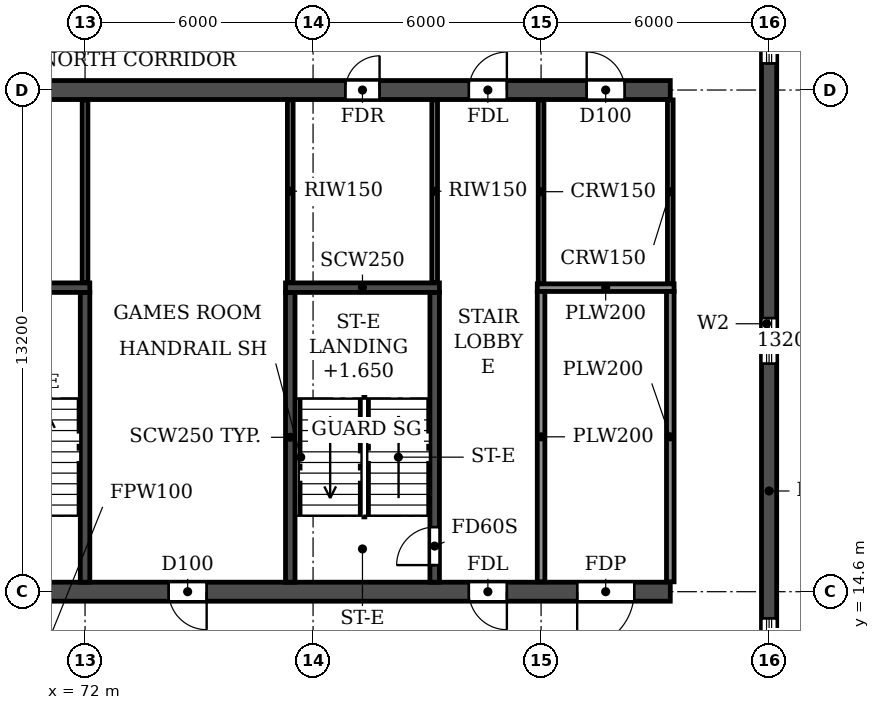
"""IFC4 building model, lengths in metres.
Left out: names, types, materials, properties, quantities, classifications, styles, units other than length and angle.
Written with IfcOpenShell. Run it as: python <this file> out.ifc"""

import sys

from ifc_helpers import new_model, si_unit, direction, frame, frame_2d, origin, place, context, subcontext, project, spatial, rectangle, extrude, element, fill, save


model = new_model("IFC4")
c1 = context("Model", 3, precision=1e-05, world=origin(), true_north=direction((0.0, 1.0)))
c2 = subcontext(c1, "Body", "Model", "MODEL_VIEW")
j1 = project(units=[si_unit("LENGTHUNIT", "METRE"), si_unit("PLANEANGLEUNIT", "RADIAN")], contexts=[c1])
p1 = place(None, origin())
s1 = spatial("IfcSite", under=j1, at=p1, CompositionType="ELEMENT")
p2 = place(p1, origin())
s2 = spatial("IfcBuilding", under=s1, at=p2, CompositionType="ELEMENT")
p3 = place(p2, frame((0.0, 0.0, 109.2)))
s3 = spatial("IfcBuildingStorey", under=s2, at=p3, CompositionType="ELEMENT", Elevation=109.2)
p4 = place(p3, frame((90.0, 4.683, 0.0), z_axis=(0.0, 0.0, 1.0), x_axis=(0.0, 1.0, 0.0)))
e1 = element("IfcWall", 1, at=p4, inside=s3, PredefinedType="SHEAR", context=c2, shape_type="SweptSolid", body=[
    extrude(rectangle(XDim=34.234, YDim=0.4, at=frame_2d((17.117, 0.0))), origin(), (0.0, 0.0, 1.0), 3.06),
])
p5 = place(p4, frame((15.917, 0.0, 0.9)))
e2 = element("IfcOpeningElement", 2, at=p5, cuts=e1, PredefinedType="OPENING", context=c2, shape_type="SweptSolid", body=[
    extrude(rectangle(XDim=1.2, YDim=1.5, at=frame_2d((0.6, 0.75))), frame((0.0, 0.21, 0.0), z_axis=(0.0, -1.0, 0.0), x_axis=(1.0, 0.0, 0.0)), (0.0, 0.0, 1.0), 0.42),
])
p6 = place(p4, frame((23.817, 0.0, 0.9)))
e3 = element("IfcOpeningElement", 3, at=p6, cuts=e1, PredefinedType="OPENING", context=c2, shape_type="SweptSolid", body=[
    extrude(rectangle(XDim=1.2, YDim=1.5, at=frame_2d((0.6, 0.75))), frame((0.0, 0.21, 0.0), z_axis=(0.0, -1.0, 0.0), x_axis=(1.0, 0.0, 0.0)), (0.0, 0.0, 1.0), 0.42),
])
p7 = place(p4, frame((8.017, 0.0, 0.9)))
e4 = element("IfcOpeningElement", 4, at=p7, cuts=e1, PredefinedType="OPENING", context=c2, shape_type="SweptSolid", body=[
    extrude(rectangle(XDim=1.2, YDim=1.5, at=frame_2d((0.6, 0.75))), frame((0.0, 0.21, 0.0), z_axis=(0.0, -1.0, 0.0), x_axis=(1.0, 0.0, 0.0)), (0.0, 0.0, 1.0), 0.42),
])
p8 = place(p4, frame((28.894, 0.0, 0.6)))
e5 = element("IfcOpeningElement", 5, at=p8, cuts=e1, PredefinedType="OPENING", context=c2, shape_type="SweptSolid", body=[
    extrude(rectangle(XDim=2.2, YDim=1.8, at=frame_2d((1.1, 0.9))), frame((0.0, 0.21, 0.0), z_axis=(0.0, -1.0, 0.0), x_axis=(1.0, 0.0, 0.0)), (0.0, 0.0, 1.0), 0.42),
])
p9 = place(p4, frame((2.541, 0.0, 0.6)))
e6 = element("IfcOpeningElement", 6, at=p9, cuts=e1, PredefinedType="OPENING", context=c2, shape_type="SweptSolid", body=[
    extrude(rectangle(XDim=2.2, YDim=1.8, at=frame_2d((1.1, 0.9))), frame((0.0, 0.21, 0.0), z_axis=(0.0, -1.0, 0.0), x_axis=(1.0, 0.0, 0.0)), (0.0, 0.0, 1.0), 0.42),
])
p10 = place(p3, frame((14.6, 14.6, 0.0), z_axis=(0.0, 0.0, 1.0), x_axis=(1.0, 0.0, 0.0)))
e7 = element("IfcWall", 7, at=p10, inside=s3, PredefinedType="SOLIDWALL", context=c2, shape_type="SweptSolid", body=[
    extrude(rectangle(XDim=72.8, YDim=0.5, at=frame_2d((36.4, 0.0))), origin(), (0.0, 0.0, 1.0), 3.06),
])
p11 = place(p10, frame((1.2, 0.0, 0.0)))
e8 = element("IfcOpeningElement", 8, at=p11, cuts=e7, PredefinedType="OPENING", context=c2, shape_type="SweptSolid", body=[
    extrude(rectangle(XDim=1.0, YDim=2.1, at=frame_2d((0.5, 1.05))), frame((0.0, 0.26, 0.0), z_axis=(0.0, -1.0, 0.0), x_axis=(1.0, 0.0, 0.0)), (0.0, 0.0, 1.0), 0.52),
])
p12 = place(p10, frame((4.3, 0.0, 0.0)))
e9 = element("IfcOpeningElement", 9, at=p12, cuts=e7, PredefinedType="OPENING", context=c2, shape_type="SweptSolid", body=[
    extrude(rectangle(XDim=1.0, YDim=2.1, at=frame_2d((0.5, 1.05))), frame((0.0, 0.26, 0.0), z_axis=(0.0, -1.0, 0.0), x_axis=(1.0, 0.0, 0.0)), (0.0, 0.0, 1.0), 0.52),
])
p13 = place(p10, frame((12.2, 0.0, 0.0)))
e10 = element("IfcOpeningElement", 10, at=p13, cuts=e7, PredefinedType="OPENING", context=c2, shape_type="SweptSolid", body=[
    extrude(rectangle(XDim=1.0, YDim=2.1, at=frame_2d((0.5, 1.05))), frame((0.0, 0.26, 0.0), z_axis=(0.0, -1.0, 0.0), x_axis=(1.0, 0.0, 0.0)), (0.0, 0.0, 1.0), 0.52),
])
p14 = place(p10, frame((16.8, 0.0, 0.0)))
e11 = element("IfcOpeningElement", 11, at=p14, cuts=e7, PredefinedType="OPENING", context=c2, shape_type="SweptSolid", body=[
    extrude(rectangle(XDim=1.0, YDim=2.1, at=frame_2d((0.5, 1.05))), frame((0.0, 0.26, 0.0), z_axis=(0.0, -1.0, 0.0), x_axis=(1.0, 0.0, 0.0)), (0.0, 0.0, 1.0), 0.52),
])
p15 = place(p10, frame((28.1, 0.0, 0.0)))
e12 = element("IfcOpeningElement", 12, at=p15, cuts=e7, PredefinedType="OPENING", context=c2, shape_type="SweptSolid", body=[
    extrude(rectangle(XDim=1.0, YDim=2.1, at=frame_2d((0.5, 1.05))), frame((0.0, 0.26, 0.0), z_axis=(0.0, -1.0, 0.0), x_axis=(1.0, 0.0, 0.0)), (0.0, 0.0, 1.0), 0.52),
])
p16 = place(p10, frame((32.0, 0.0, 0.0)))
e13 = element("IfcOpeningElement", 13, at=p16, cuts=e7, PredefinedType="OPENING", context=c2, shape_type="SweptSolid", body=[
    extrude(rectangle(XDim=1.0, YDim=2.1, at=frame_2d((0.5, 1.05))), frame((0.0, 0.26, 0.0), z_axis=(0.0, -1.0, 0.0), x_axis=(1.0, 0.0, 0.0)), (0.0, 0.0, 1.0), 0.52),
])
p17 = place(p10, frame((35.9, 0.0, 0.0)))
e14 = element("IfcOpeningElement", 14, at=p17, cuts=e7, PredefinedType="OPENING", context=c2, shape_type="SweptSolid", body=[
    extrude(rectangle(XDim=1.0, YDim=2.1, at=frame_2d((0.5, 1.05))), frame((0.0, 0.26, 0.0), z_axis=(0.0, -1.0, 0.0), x_axis=(1.0, 0.0, 0.0)), (0.0, 0.0, 1.0), 0.52),
])
p18 = place(p10, frame((39.8, 0.0, 0.0)))
e15 = element("IfcOpeningElement", 15, at=p18, cuts=e7, PredefinedType="OPENING", context=c2, shape_type="SweptSolid", body=[
    extrude(rectangle(XDim=1.0, YDim=2.1, at=frame_2d((0.5, 1.05))), frame((0.0, 0.26, 0.0), z_axis=(0.0, -1.0, 0.0), x_axis=(1.0, 0.0, 0.0)), (0.0, 0.0, 1.0), 0.52),
])
p19 = place(p10, frame((43.7, 0.0, 0.0)))
e16 = element("IfcOpeningElement", 16, at=p19, cuts=e7, PredefinedType="OPENING", context=c2, shape_type="SweptSolid", body=[
    extrude(rectangle(XDim=1.0, YDim=2.1, at=frame_2d((0.5, 1.05))), frame((0.0, 0.26, 0.0), z_axis=(0.0, -1.0, 0.0), x_axis=(1.0, 0.0, 0.0)), (0.0, 0.0, 1.0), 0.52),
])
p20 = place(p10, frame((55.0, 0.0, 0.0)))
e17 = element("IfcOpeningElement", 17, at=p20, cuts=e7, PredefinedType="OPENING", context=c2, shape_type="SweptSolid", body=[
    extrude(rectangle(XDim=1.0, YDim=2.1, at=frame_2d((0.5, 1.05))), frame((0.0, 0.26, 0.0), z_axis=(0.0, -1.0, 0.0), x_axis=(1.0, 0.0, 0.0)), (0.0, 0.0, 1.0), 0.52),
])
p21 = place(p10, frame((59.6, 0.0, 0.0)))
e18 = element("IfcOpeningElement", 18, at=p21, cuts=e7, PredefinedType="OPENING", context=c2, shape_type="SweptSolid", body=[
    extrude(rectangle(XDim=1.0, YDim=2.1, at=frame_2d((0.5, 1.05))), frame((0.0, 0.26, 0.0), z_axis=(0.0, -1.0, 0.0), x_axis=(1.0, 0.0, 0.0)), (0.0, 0.0, 1.0), 0.52),
])
p22 = place(p10, frame((67.5, 0.0, 0.0)))
e19 = element("IfcOpeningElement", 19, at=p22, cuts=e7, PredefinedType="OPENING", context=c2, shape_type="SweptSolid", body=[
    extrude(rectangle(XDim=1.0, YDim=2.1, at=frame_2d((0.5, 1.05))), frame((0.0, 0.26, 0.0), z_axis=(0.0, -1.0, 0.0), x_axis=(1.0, 0.0, 0.0)), (0.0, 0.0, 1.0), 0.52),
])
p23 = place(p10, frame((70.35, 0.0, 0.0)))
e20 = element("IfcOpeningElement", 20, at=p23, cuts=e7, PredefinedType="OPENING", context=c2, shape_type="SweptSolid", body=[
    extrude(rectangle(XDim=1.5, YDim=2.1, at=frame_2d((0.75, 1.05))), frame((0.0, 0.26, 0.0), z_axis=(0.0, -1.0, 0.0), x_axis=(1.0, 0.0, 0.0)), (0.0, 0.0, 1.0), 0.52),
])
p24 = place(p3, frame((14.6, 27.8, 0.0), z_axis=(0.0, 0.0, 1.0), x_axis=(1.0, 0.0, 0.0)))
e21 = element("IfcWall", 21, at=p24, inside=s3, PredefinedType="SOLIDWALL", context=c2, shape_type="SweptSolid", body=[
    extrude(rectangle(XDim=72.8, YDim=0.5, at=frame_2d((36.4, 0.0))), origin(), (0.0, 0.0, 1.0), 3.06),
])
p25 = place(p24, frame((1.2, 0.0, 0.0)))
e22 = element("IfcOpeningElement", 22, at=p25, cuts=e21, PredefinedType="OPENING", context=c2, shape_type="SweptSolid", body=[
    extrude(rectangle(XDim=1.0, YDim=2.1, at=frame_2d((0.5, 1.05))), frame((0.0, 0.26, 0.0), z_axis=(0.0, -1.0, 0.0), x_axis=(1.0, 0.0, 0.0)), (0.0, 0.0, 1.0), 0.52),
])
p26 = place(p24, frame((4.3, 0.0, 0.0)))
e23 = element("IfcOpeningElement", 23, at=p26, cuts=e21, PredefinedType="OPENING", context=c2, shape_type="SweptSolid", body=[
    extrude(rectangle(XDim=1.0, YDim=2.1, at=frame_2d((0.5, 1.05))), frame((0.0, 0.26, 0.0), z_axis=(0.0, -1.0, 0.0), x_axis=(1.0, 0.0, 0.0)), (0.0, 0.0, 1.0), 0.52),
])
p27 = place(p24, frame((7.65, 0.0, 0.0)))
e24 = element("IfcOpeningElement", 24, at=p27, cuts=e21, PredefinedType="OPENING", context=c2, shape_type="SweptSolid", body=[
    extrude(rectangle(XDim=0.9, YDim=2.1, at=frame_2d((0.45, 1.05))), frame((0.0, 0.26, 0.0), z_axis=(0.0, -1.0, 0.0), x_axis=(1.0, 0.0, 0.0)), (0.0, 0.0, 1.0), 0.52),
])
p28 = place(p24, frame((16.85, 0.0, 0.0)))
e25 = element("IfcOpeningElement", 25, at=p28, cuts=e21, PredefinedType="OPENING", context=c2, shape_type="SweptSolid", body=[
    extrude(rectangle(XDim=0.9, YDim=2.1, at=frame_2d((0.45, 1.05))), frame((0.0, 0.26, 0.0), z_axis=(0.0, -1.0, 0.0), x_axis=(1.0, 0.0, 0.0)), (0.0, 0.0, 1.0), 0.52),
])
p29 = place(p24, frame((20.0, 0.0, 0.0)))
e26 = element("IfcOpeningElement", 26, at=p29, cuts=e21, PredefinedType="OPENING", context=c2, shape_type="SweptSolid", body=[
    extrude(rectangle(XDim=1.0, YDim=2.1, at=frame_2d((0.5, 1.05))), frame((0.0, 0.26, 0.0), z_axis=(0.0, -1.0, 0.0), x_axis=(1.0, 0.0, 0.0)), (0.0, 0.0, 1.0), 0.52),
])
p30 = place(p24, frame((25.2, 0.0, 0.0)))
e27 = element("IfcOpeningElement", 27, at=p30, cuts=e21, PredefinedType="OPENING", context=c2, shape_type="SweptSolid", body=[
    extrude(rectangle(XDim=1.0, YDim=2.1, at=frame_2d((0.5, 1.05))), frame((0.0, 0.26, 0.0), z_axis=(0.0, -1.0, 0.0), x_axis=(1.0, 0.0, 0.0)), (0.0, 0.0, 1.0), 0.52),
])
p31 = place(p24, frame((33.0, 0.0, 0.0)))
e28 = element("IfcOpeningElement", 28, at=p31, cuts=e21, PredefinedType="OPENING", context=c2, shape_type="SweptSolid", body=[
    extrude(rectangle(XDim=1.0, YDim=2.1, at=frame_2d((0.5, 1.05))), frame((0.0, 0.26, 0.0), z_axis=(0.0, -1.0, 0.0), x_axis=(1.0, 0.0, 0.0)), (0.0, 0.0, 1.0), 0.52),
])
p32 = place(p24, frame((35.9, 0.0, 0.0)))
e29 = element("IfcOpeningElement", 29, at=p32, cuts=e21, PredefinedType="OPENING", context=c2, shape_type="SweptSolid", body=[
    extrude(rectangle(XDim=1.0, YDim=2.1, at=frame_2d((0.5, 1.05))), frame((0.0, 0.26, 0.0), z_axis=(0.0, -1.0, 0.0), x_axis=(1.0, 0.0, 0.0)), (0.0, 0.0, 1.0), 0.52),
])
p33 = place(p24, frame((38.8, 0.0, 0.0)))
e30 = element("IfcOpeningElement", 30, at=p33, cuts=e21, PredefinedType="OPENING", context=c2, shape_type="SweptSolid", body=[
    extrude(rectangle(XDim=1.0, YDim=2.1, at=frame_2d((0.5, 1.05))), frame((0.0, 0.26, 0.0), z_axis=(0.0, -1.0, 0.0), x_axis=(1.0, 0.0, 0.0)), (0.0, 0.0, 1.0), 0.52),
])
p34 = place(p24, frame((42.7, 0.0, 0.0)))
e31 = element("IfcOpeningElement", 31, at=p34, cuts=e21, PredefinedType="OPENING", context=c2, shape_type="SweptSolid", body=[
    extrude(rectangle(XDim=1.0, YDim=2.1, at=frame_2d((0.5, 1.05))), frame((0.0, 0.26, 0.0), z_axis=(0.0, -1.0, 0.0), x_axis=(1.0, 0.0, 0.0)), (0.0, 0.0, 1.0), 0.52),
])
p35 = place(p24, frame((47.65, 0.0, 0.0)))
e32 = element("IfcOpeningElement", 32, at=p35, cuts=e21, PredefinedType="OPENING", context=c2, shape_type="SweptSolid", body=[
    extrude(rectangle(XDim=1.5, YDim=2.1, at=frame_2d((0.75, 1.05))), frame((0.0, 0.26, 0.0), z_axis=(0.0, -1.0, 0.0), x_axis=(1.0, 0.0, 0.0)), (0.0, 0.0, 1.0), 0.52),
])
p36 = place(p24, frame((51.8, 0.0, 0.0)))
e33 = element("IfcOpeningElement", 33, at=p36, cuts=e21, PredefinedType="OPENING", context=c2, shape_type="SweptSolid", body=[
    extrude(rectangle(XDim=1.0, YDim=2.1, at=frame_2d((0.5, 1.05))), frame((0.0, 0.26, 0.0), z_axis=(0.0, -1.0, 0.0), x_axis=(1.0, 0.0, 0.0)), (0.0, 0.0, 1.0), 0.52),
])
p37 = place(p24, frame((55.05, 0.0, 0.0)))
e34 = element("IfcOpeningElement", 34, at=p37, cuts=e21, PredefinedType="OPENING", context=c2, shape_type="SweptSolid", body=[
    extrude(rectangle(XDim=0.9, YDim=2.1, at=frame_2d((0.45, 1.05))), frame((0.0, 0.26, 0.0), z_axis=(0.0, -1.0, 0.0), x_axis=(1.0, 0.0, 0.0)), (0.0, 0.0, 1.0), 0.52),
])
p38 = place(p24, frame((64.25, 0.0, 0.0)))
e35 = element("IfcOpeningElement", 35, at=p38, cuts=e21, PredefinedType="OPENING", context=c2, shape_type="SweptSolid", body=[
    extrude(rectangle(XDim=0.9, YDim=2.1, at=frame_2d((0.45, 1.05))), frame((0.0, 0.26, 0.0), z_axis=(0.0, -1.0, 0.0), x_axis=(1.0, 0.0, 0.0)), (0.0, 0.0, 1.0), 0.52),
])
p39 = place(p24, frame((67.5, 0.0, 0.0)))
e36 = element("IfcOpeningElement", 36, at=p39, cuts=e21, PredefinedType="OPENING", context=c2, shape_type="SweptSolid", body=[
    extrude(rectangle(XDim=1.0, YDim=2.1, at=frame_2d((0.5, 1.05))), frame((0.0, 0.26, 0.0), z_axis=(0.0, -1.0, 0.0), x_axis=(1.0, 0.0, 0.0)), (0.0, 0.0, 1.0), 0.52),
])
p40 = place(p24, frame((70.6, 0.0, 0.0)))
e37 = element("IfcOpeningElement", 37, at=p40, cuts=e21, PredefinedType="OPENING", context=c2, shape_type="SweptSolid", body=[
    extrude(rectangle(XDim=1.0, YDim=2.1, at=frame_2d((0.5, 1.05))), frame((0.0, 0.26, 0.0), z_axis=(0.0, -1.0, 0.0), x_axis=(1.0, 0.0, 0.0)), (0.0, 0.0, 1.0), 0.52),
])
p41 = place(p3, frame((72.0, 14.85, 0.0), z_axis=(0.0, 0.0, 1.0), x_axis=(0.0, 1.0, 0.0)))
e38 = element("IfcWall", 38, at=p41, inside=s3, PredefinedType="SOLIDWALL", context=c2, shape_type="SweptSolid", body=[
    extrude(rectangle(XDim=7.625, YDim=0.25, at=frame_2d((3.812, 0.0))), origin(), (0.0, 0.0, 1.0), 3.06),
])
p42 = place(p3, frame((68.075, 22.6, 0.0), z_axis=(0.0, 0.0, 1.0), x_axis=(1.0, 0.0, 0.0)))
e39 = element("IfcWall", 39, at=p42, inside=s3, PredefinedType="SOLIDWALL", context=c2, shape_type="SweptSolid", body=[
    extrude(rectangle(XDim=4.05, YDim=0.25, at=frame_2d((2.025, 0.0))), origin(), (0.0, 0.0, 1.0), 3.06),
])
p43 = place(p3, frame((77.4, 14.85, 0.0), z_axis=(0.0, 0.0, 1.0), x_axis=(0.0, 1.0, 0.0)))
e40 = element("IfcWall", 40, at=p43, inside=s3, PredefinedType="SOLIDWALL", context=c2, shape_type="SweptSolid", body=[
    extrude(rectangle(XDim=7.625, YDim=0.25, at=frame_2d((3.812, 0.0))), origin(), (0.0, 0.0, 1.0), 3.06),
])
p44 = place(p3, frame((81.2, 14.85, 0.0), z_axis=(0.0, 0.0, 1.0), x_axis=(0.0, 1.0, 0.0)))
e41 = element("IfcWall", 41, at=p44, inside=s3, PredefinedType="SOLIDWALL", context=c2, shape_type="SweptSolid", body=[
    extrude(rectangle(XDim=7.625, YDim=0.25, at=frame_2d((3.812, 0.0))), origin(), (0.0, 0.0, 1.0), 3.06),
])
p45 = place(p44, frame((0.45, 0.0, 0.0)))
e42 = element("IfcOpeningElement", 42, at=p45, cuts=e41, PredefinedType="OPENING", context=c2, shape_type="SweptSolid", body=[
    extrude(rectangle(XDim=1.0, YDim=2.1, at=frame_2d((0.5, 1.05))), frame((0.0, 0.135, 0.0), z_axis=(0.0, -1.0, 0.0), x_axis=(1.0, 0.0, 0.0)), (0.0, 0.0, 1.0), 0.27),
])
p46 = place(p3, frame((77.275, 22.6, 0.0), z_axis=(0.0, 0.0, 1.0), x_axis=(1.0, 0.0, 0.0)))
e43 = element("IfcWall", 43, at=p46, inside=s3, PredefinedType="SOLIDWALL", context=c2, shape_type="SweptSolid", body=[
    extrude(rectangle(XDim=4.05, YDim=0.25, at=frame_2d((2.025, 0.0))), origin(), (0.0, 0.0, 1.0), 3.06),
])
for number, where, z_axis, x_axis in (
    (44, (84.0, 22.7, 0.0), (0.0, 0.0, 1.0), (0.0, 1.0, 0.0)),
    (45, (87.4, 22.7, 0.0), (0.0, 0.0, 1.0), (0.0, 1.0, 0.0)),
):
    element("IfcWall", number, at=place(p3, frame(where, z_axis=z_axis, x_axis=x_axis)), inside=s3, PredefinedType="PARTITIONING", context=c2, shape_type="SweptSolid", body=[
        extrude(rectangle(XDim=4.84, YDim=0.15, at=frame_2d((2.42, 0.0))), origin(), (0.0, 0.0, 1.0), 3.06),
    ])
p47 = place(p3, frame((83.9, 22.6, 0.0), z_axis=(0.0, 0.0, 1.0), x_axis=(1.0, 0.0, 0.0)))
e46 = element("IfcWall", 46, at=p47, inside=s3, PredefinedType="PARTITIONING", context=c2, shape_type="SweptSolid", body=[
    extrude(rectangle(XDim=3.6, YDim=0.2, at=frame_2d((1.8, 0.0))), origin(), (0.0, 0.0, 1.0), 3.06),
])
for number, where, z_axis, x_axis in (
    (47, (84.0, 14.86, 0.0), (0.0, 0.0, 1.0), (0.0, 1.0, 0.0)),
    (48, (87.4, 14.86, 0.0), (0.0, 0.0, 1.0), (0.0, 1.0, 0.0)),
):
    element("IfcWall", number, at=place(p3, frame(where, z_axis=z_axis, x_axis=x_axis)), inside=s3, PredefinedType="PARTITIONING", context=c2, shape_type="SweptSolid", body=[
        extrude(rectangle(XDim=7.64, YDim=0.2, at=frame_2d((3.82, 0.0))), origin(), (0.0, 0.0, 1.0), 3.06),
    ])
for number, where, z_axis, x_axis in (
    (49, (72.0, 22.735, 0.0), (0.0, 0.0, 1.0), (0.0, 1.0, 0.0)),
    (50, (77.4, 22.735, 0.0), (0.0, 0.0, 1.0), (0.0, 1.0, 0.0)),
    (51, (81.2, 22.735, 0.0), (0.0, 0.0, 1.0), (0.0, 1.0, 0.0)),
):
    element("IfcWall", number, at=place(p3, frame(where, z_axis=z_axis, x_axis=x_axis)), inside=s3, PredefinedType="PARTITIONING", context=c2, shape_type="SweptSolid", body=[
        extrude(rectangle(XDim=4.805, YDim=0.15, at=frame_2d((2.402, 0.0))), origin(), (0.0, 0.0, 1.0), 3.06),
    ])
p48 = place(p5, origin())
e52 = element("IfcWindow", 52, at=p48, inside=s3, PartitioningType="SINGLE_PANEL", PredefinedType="WINDOW", context=c2, shape_type="SweptSolid", body=[
    extrude(rectangle(XDim=1.2, YDim=1.5, at=frame_2d((0.6, 0.75))), frame((0.0, 0.03, 0.0), z_axis=(0.0, -1.0, 0.0), x_axis=(1.0, 0.0, 0.0)), (0.0, 0.0, 1.0), 0.06),
])
fill(e2, e52)
p49 = place(p6, origin())
e53 = element("IfcWindow", 53, at=p49, inside=s3, PartitioningType="SINGLE_PANEL", PredefinedType="WINDOW", context=c2, shape_type="SweptSolid", body=[
    extrude(rectangle(XDim=1.2, YDim=1.5, at=frame_2d((0.6, 0.75))), frame((0.0, 0.03, 0.0), z_axis=(0.0, -1.0, 0.0), x_axis=(1.0, 0.0, 0.0)), (0.0, 0.0, 1.0), 0.06),
])
fill(e3, e53)
p50 = place(p7, origin())
e54 = element("IfcWindow", 54, at=p50, inside=s3, PartitioningType="SINGLE_PANEL", PredefinedType="WINDOW", context=c2, shape_type="SweptSolid", body=[
    extrude(rectangle(XDim=1.2, YDim=1.5, at=frame_2d((0.6, 0.75))), frame((0.0, 0.03, 0.0), z_axis=(0.0, -1.0, 0.0), x_axis=(1.0, 0.0, 0.0)), (0.0, 0.0, 1.0), 0.06),
])
fill(e4, e54)
p51 = place(p38, origin())
e55 = element("IfcDoor", 55, at=p51, inside=s3, OperationType="SINGLE_SWING_RIGHT", PredefinedType="DOOR", context=c2, shape_type="SweptSolid", body=[
    extrude(rectangle(XDim=0.9, YDim=2.1, at=frame_2d((0.45, 1.05))), frame((0.0, 0.025, 0.0), z_axis=(0.0, -1.0, 0.0), x_axis=(1.0, 0.0, 0.0)), (0.0, 0.0, 1.0), 0.05),
])
fill(e35, e55)
p52 = place(p39, origin())
e56 = element("IfcDoor", 56, at=p52, inside=s3, OperationType="SINGLE_SWING_RIGHT", PredefinedType="DOOR", context=c2, shape_type="SweptSolid", body=[
    extrude(rectangle(XDim=1.0, YDim=2.1, at=frame_2d((0.5, 1.05))), frame((0.0, 0.025, 0.0), z_axis=(0.0, -1.0, 0.0), x_axis=(1.0, 0.0, 0.0)), (0.0, 0.0, 1.0), 0.05),
])
fill(e36, e56)
p53 = place(p40, origin())
e57 = element("IfcDoor", 57, at=p53, inside=s3, OperationType="SINGLE_SWING_LEFT", PredefinedType="DOOR", context=c2, shape_type="SweptSolid", body=[
    extrude(rectangle(XDim=1.0, YDim=2.1, at=frame_2d((0.5, 1.05))), frame((0.0, 0.025, 0.0), z_axis=(0.0, -1.0, 0.0), x_axis=(1.0, 0.0, 0.0)), (0.0, 0.0, 1.0), 0.05),
])
fill(e37, e57)
p54 = place(p21, frame((1.0, 0.0, 0.0), z_axis=(0.0, 0.0, 1.0), x_axis=(-1.0, 0.0, 0.0)))
e58 = element("IfcDoor", 58, at=p54, inside=s3, OperationType="SINGLE_SWING_LEFT", PredefinedType="DOOR", context=c2, shape_type="SweptSolid", body=[
    extrude(rectangle(XDim=1.0, YDim=2.1, at=frame_2d((0.5, 1.05))), frame((0.0, 0.025, 0.0), z_axis=(0.0, -1.0, 0.0), x_axis=(1.0, 0.0, 0.0)), (0.0, 0.0, 1.0), 0.05),
])
fill(e18, e58)
p55 = place(p22, frame((1.0, 0.0, 0.0), z_axis=(0.0, 0.0, 1.0), x_axis=(-1.0, 0.0, 0.0)))
e59 = element("IfcDoor", 59, at=p55, inside=s3, OperationType="SINGLE_SWING_LEFT", PredefinedType="DOOR", context=c2, shape_type="SweptSolid", body=[
    extrude(rectangle(XDim=1.0, YDim=2.1, at=frame_2d((0.5, 1.05))), frame((0.0, 0.025, 0.0), z_axis=(0.0, -1.0, 0.0), x_axis=(1.0, 0.0, 0.0)), (0.0, 0.0, 1.0), 0.05),
])
fill(e19, e59)
p56 = place(p23, frame((1.5, 0.0, 0.0), z_axis=(0.0, 0.0, 1.0), x_axis=(-1.0, 0.0, 0.0)))
e60 = element("IfcDoor", 60, at=p56, inside=s3, OperationType="DOUBLE_DOOR_SINGLE_SWING", PredefinedType="DOOR", context=c2, shape_type="SweptSolid", body=[
    extrude(rectangle(XDim=1.5, YDim=2.1, at=frame_2d((0.75, 1.05))), frame((0.0, 0.025, 0.0), z_axis=(0.0, -1.0, 0.0), x_axis=(1.0, 0.0, 0.0)), (0.0, 0.0, 1.0), 0.05),
])
fill(e20, e60)
p57 = place(p45, origin())
e61 = element("IfcDoor", 61, at=p57, inside=s3, OperationType="SINGLE_SWING_LEFT", PredefinedType="DOOR", context=c2, shape_type="SweptSolid", body=[
    extrude(rectangle(XDim=1.0, YDim=2.1, at=frame_2d((0.5, 1.05))), frame((0.0, 0.025, 0.0), z_axis=(0.0, -1.0, 0.0), x_axis=(1.0, 0.0, 0.0)), (0.0, 0.0, 1.0), 0.05),
])
fill(e42, e61)
save(model, sys.argv[1])
